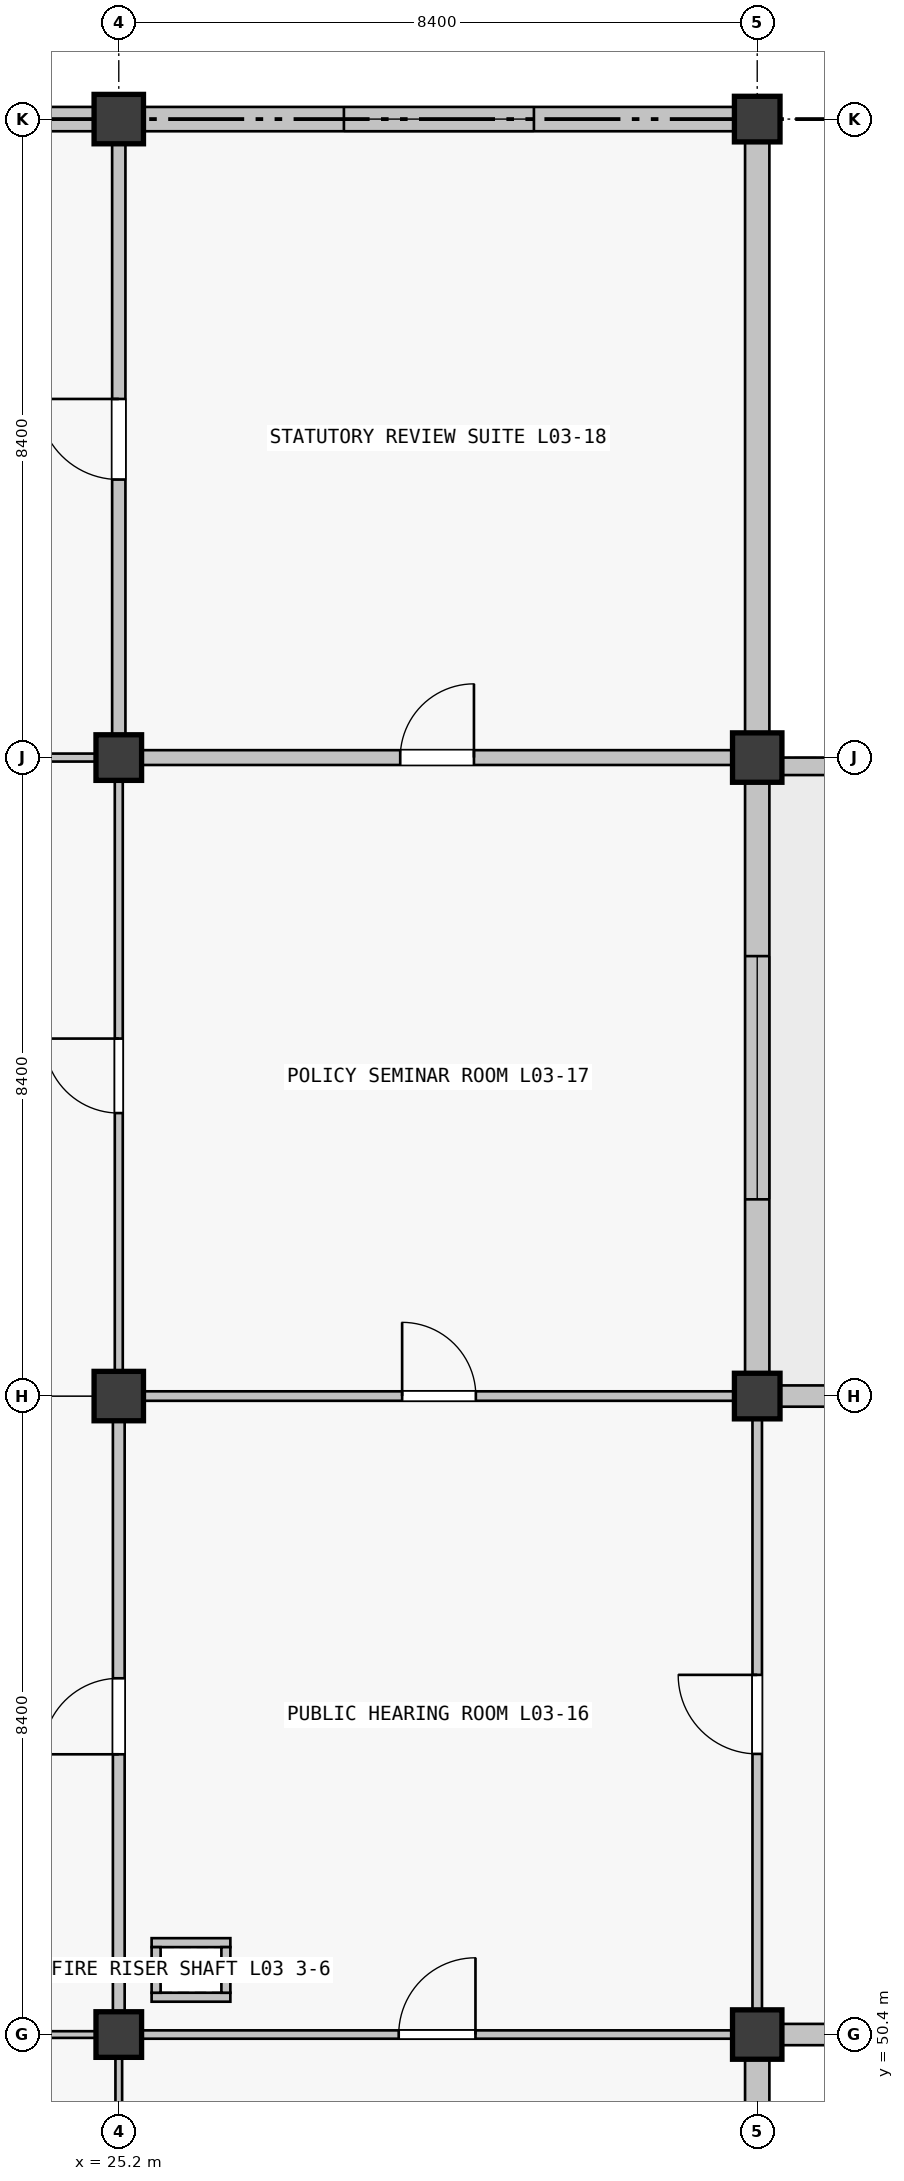
"""IFC4 building model, lengths in metres.
Left out: names, types, materials, properties, quantities, classifications, styles, units other than length and angle.
Written with IfcOpenShell. Run it as: python <this file> out.ifc"""

import sys

from ifc_helpers import new_model, si_unit, direction, frame, frame_2d, origin, origin_2d, place, context, subcontext, project, spatial, rectangle, extrude, element, fill, save


model = new_model("IFC4")
c1 = context("Model", 3, precision=1e-05, world=origin(), true_north=direction((0.0, 1.0)))
c2 = subcontext(c1, "Body", "Model", "MODEL_VIEW")
j1 = project(units=[si_unit("LENGTHUNIT", "METRE"), si_unit("PLANEANGLEUNIT", "RADIAN")], contexts=[c1])
p1 = place(None, origin())
s1 = spatial("IfcSite", under=j1, at=p1, CompositionType="ELEMENT")
p2 = place(p1, origin())
s2 = spatial("IfcBuilding", under=s1, at=p2, CompositionType="ELEMENT")
p3 = place(p2, frame((0.0, 0.0, 14.76)))
s3 = spatial("IfcBuildingStorey", under=s2, at=p3, CompositionType="ELEMENT", Elevation=14.76)
p4 = place(p3, frame((25.2, 50.4, 0.0), z_axis=(0.0, 0.0, 1.0), x_axis=(1.0, 0.0, 0.0)))
e1 = element("IfcColumn", 1, at=p4, inside=s3, PredefinedType="COLUMN", context=c2, shape_type="SweptSolid", body=[
    extrude(rectangle(XDim=0.6, YDim=0.6, at=origin_2d()), origin(), (0.0, 0.0, 1.0), 4.32),
])
p5 = place(p3, frame((25.2, 58.8, 0.0), z_axis=(0.0, 0.0, 1.0), x_axis=(1.0, 0.0, 0.0)))
e2 = element("IfcColumn", 2, at=p5, inside=s3, PredefinedType="COLUMN", context=c2, shape_type="SweptSolid", body=[
    extrude(rectangle(XDim=0.65, YDim=0.65, at=origin_2d()), origin(), (0.0, 0.0, 1.0), 4.32),
])
p6 = place(p3, frame((25.2, 67.2, 0.0), z_axis=(0.0, 0.0, 1.0), x_axis=(1.0, 0.0, 0.0)))
e3 = element("IfcColumn", 3, at=p6, inside=s3, PredefinedType="COLUMN", context=c2, shape_type="SweptSolid", body=[
    extrude(rectangle(XDim=0.6, YDim=0.6, at=origin_2d()), origin(), (0.0, 0.0, 1.0), 4.32),
])
for number, where, z_axis, x_axis in (
    (4, (25.2, 75.6, 0.0), (0.0, 0.0, 1.0), (1.0, 0.0, 0.0)),
    (5, (33.6, 50.4, 0.0), (0.0, 0.0, 1.0), (1.0, 0.0, 0.0)),
):
    element("IfcColumn", number, at=place(p3, frame(where, z_axis=z_axis, x_axis=x_axis)), inside=s3, PredefinedType="COLUMN", context=c2, shape_type="SweptSolid", body=[
        extrude(rectangle(XDim=0.65, YDim=0.65, at=origin_2d()), origin(), (0.0, 0.0, 1.0), 4.32),
    ])
p7 = place(p3, frame((33.6, 58.8, 0.0), z_axis=(0.0, 0.0, 1.0), x_axis=(1.0, 0.0, 0.0)))
e6 = element("IfcColumn", 6, at=p7, inside=s3, PredefinedType="COLUMN", context=c2, shape_type="SweptSolid", body=[
    extrude(rectangle(XDim=0.6, YDim=0.6, at=origin_2d()), origin(), (0.0, 0.0, 1.0), 4.32),
])
p8 = place(p3, frame((33.6, 67.2, 0.0), z_axis=(0.0, 0.0, 1.0), x_axis=(1.0, 0.0, 0.0)))
e7 = element("IfcColumn", 7, at=p8, inside=s3, PredefinedType="COLUMN", context=c2, shape_type="SweptSolid", body=[
    extrude(rectangle(XDim=0.65, YDim=0.65, at=origin_2d()), origin(), (0.0, 0.0, 1.0), 4.32),
])
p9 = place(p3, frame((33.6, 75.6, 0.0), z_axis=(0.0, 0.0, 1.0), x_axis=(1.0, 0.0, 0.0)))
e8 = element("IfcColumn", 8, at=p9, inside=s3, PredefinedType="COLUMN", context=c2, shape_type="SweptSolid", body=[
    extrude(rectangle(XDim=0.6, YDim=0.6, at=origin_2d()), origin(), (0.0, 0.0, 1.0), 4.32),
])
p10 = place(p3, frame((17.101, 75.6, 0.0), z_axis=(0.0, 0.0, 1.0), x_axis=(1.0, 0.0, 0.0)))
e9 = element("IfcWall", 9, at=p10, inside=s3, PredefinedType="SOLIDWALL", context=c2, shape_type="SweptSolid", body=[
    extrude(rectangle(XDim=7.773, YDim=0.32, at=frame_2d((3.886, 0.0))), origin(), (0.0, 0.0, 1.0), 3.37),
])
p11 = place(p10, frame((2.986, 0.0, 0.9)))
e10 = element("IfcOpeningElement", 10, at=p11, cuts=e9, PredefinedType="OPENING", context=c2, shape_type="SweptSolid", body=[
    extrude(rectangle(XDim=1.8, YDim=1.35, at=frame_2d((0.9, 0.675))), frame((0.0, 0.16, 0.0), z_axis=(0.0, -1.0, 0.0), x_axis=(1.0, 0.0, 0.0)), (0.0, 0.0, 1.0), 0.32),
])
p12 = place(p3, frame((33.6, 50.074, 0.0), z_axis=(0.0, 0.0, 1.0), x_axis=(0.0, -1.0, 0.0)))
e11 = element("IfcWall", 11, at=p12, inside=s3, PredefinedType="SOLIDWALL", context=c2, shape_type="SweptSolid", body=[
    extrude(rectangle(XDim=7.773, YDim=0.32, at=frame_2d((3.886, 0.0))), origin(), (0.0, 0.0, 1.0), 3.37),
])
p13 = place(p12, frame((3.186, 0.0, 0.9)))
e12 = element("IfcOpeningElement", 12, at=p13, cuts=e11, PredefinedType="OPENING", context=c2, shape_type="SweptSolid", body=[
    extrude(rectangle(XDim=1.4, YDim=1.75, at=frame_2d((0.7, 0.875))), frame((0.0, 0.16, 0.0), z_axis=(0.0, -1.0, 0.0), x_axis=(1.0, 0.0, 0.0)), (0.0, 0.0, 1.0), 0.32),
])
p14 = place(p3, frame((33.6, 66.874, 0.0), z_axis=(0.0, 0.0, 1.0), x_axis=(0.0, -1.0, 0.0)))
e13 = element("IfcWall", 13, at=p14, inside=s3, PredefinedType="SOLIDWALL", context=c2, shape_type="SweptSolid", body=[
    extrude(rectangle(XDim=7.773, YDim=0.32, at=frame_2d((3.886, 0.0))), origin(), (0.0, 0.0, 1.0), 3.37),
])
p15 = place(p14, frame((2.286, 0.0, 0.9)))
e14 = element("IfcOpeningElement", 14, at=p15, cuts=e13, PredefinedType="OPENING", context=c2, shape_type="SweptSolid", body=[
    extrude(rectangle(XDim=3.2, YDim=1.75, at=frame_2d((1.6, 0.875))), frame((0.0, 0.16, 0.0), z_axis=(0.0, -1.0, 0.0), x_axis=(1.0, 0.0, 0.0)), (0.0, 0.0, 1.0), 0.32),
])
p16 = place(p3, frame((25.526, 75.6, 0.0), z_axis=(0.0, 0.0, 1.0), x_axis=(1.0, 0.0, 0.0)))
e15 = element("IfcWall", 15, at=p16, inside=s3, PredefinedType="SOLIDWALL", context=c2, shape_type="SweptSolid", body=[
    extrude(rectangle(XDim=7.773, YDim=0.32, at=frame_2d((3.887, 0.0))), origin(), (0.0, 0.0, 1.0), 3.37),
])
p17 = place(p16, frame((2.636, 0.0, 0.9)))
e16 = element("IfcOpeningElement", 16, at=p17, cuts=e15, PredefinedType="OPENING", context=c2, shape_type="SweptSolid", body=[
    extrude(rectangle(XDim=2.5, YDim=1.65, at=frame_2d((1.25, 0.825))), frame((0.0, 0.16, 0.0), z_axis=(0.0, -1.0, 0.0), x_axis=(1.0, 0.0, 0.0)), (0.0, 0.0, 1.0), 0.32),
])
p18 = place(p3, frame((33.6, 75.299, 0.0), z_axis=(0.0, 0.0, 1.0), x_axis=(0.0, -1.0, 0.0)))
e17 = element("IfcWall", 17, at=p18, inside=s3, PredefinedType="SOLIDWALL", context=c2, shape_type="SweptSolid", body=[
    extrude(rectangle(XDim=7.773, YDim=0.32, at=frame_2d((3.887, 0.0))), origin(), (0.0, 0.0, 1.0), 3.37),
])
p19 = place(p3, frame((41.724, 50.4, 0.0), z_axis=(0.0, 0.0, 1.0), x_axis=(-1.0, 0.0, 0.0)))
e18 = element("IfcWall", 18, at=p19, inside=s3, PredefinedType="SOLIDWALL", context=c2, shape_type="SweptSolid", body=[
    extrude(rectangle(XDim=7.798, YDim=0.28, at=frame_2d((3.899, 0.0))), origin(), (0.0, 0.0, 1.0), 3.37),
])
p20 = place(p3, frame((33.901, 58.8, 0.0), z_axis=(0.0, 0.0, 1.0), x_axis=(1.0, 0.0, 0.0)))
e19 = element("IfcWall", 19, at=p20, inside=s3, PredefinedType="SOLIDWALL", context=c2, shape_type="SweptSolid", body=[
    extrude(rectangle(XDim=7.823, YDim=0.28, at=frame_2d((3.912, 0.0))), origin(), (0.0, 0.0, 1.0), 3.37),
])
p21 = place(p3, frame((33.86, 67.085, 0.0), z_axis=(0.0, 0.0, 1.0), x_axis=(1.0, 0.0, 0.0)))
e20 = element("IfcWall", 20, at=p21, inside=s3, PredefinedType="PARAPET", context=c2, shape_type="SweptSolid", body=[
    extrude(rectangle(XDim=7.88, YDim=0.23, at=frame_2d((3.94, 0.0))), origin(), (0.0, 0.0, 1.0), 0.95),
])
for number, where, z_axis, x_axis in (
    (21, (25.632, 50.891, 0.0), (0.0, 0.0, 1.0), (1.0, 0.0, 0.0)),
    (22, (25.632, 51.609, 0.0), (0.0, 0.0, 1.0), (1.0, 0.0, 0.0)),
):
    element("IfcWall", number, at=place(p3, frame(where, z_axis=z_axis, x_axis=x_axis)), inside=s3, PredefinedType="PARTITIONING", context=c2, shape_type="SweptSolid", body=[
        extrude(rectangle(XDim=1.036, YDim=0.118, at=frame_2d((0.518, 0.0))), origin(), (0.0, 0.0, 1.0), 3.35),
    ])
for number, where, z_axis, x_axis in (
    (23, (25.691, 50.95, 0.0), (0.0, 0.0, 1.0), (0.0, 1.0, 0.0)),
    (24, (26.609, 50.95, 0.0), (0.0, 0.0, 1.0), (0.0, 1.0, 0.0)),
):
    element("IfcWall", number, at=place(p3, frame(where, z_axis=z_axis, x_axis=x_axis)), inside=s3, PredefinedType="PARTITIONING", context=c2, shape_type="SweptSolid", body=[
        extrude(rectangle(XDim=0.6, YDim=0.118, at=frame_2d((0.3, 0.0))), origin(), (0.0, 0.0, 1.0), 3.35),
    ])
p22 = place(p3, frame((17.127, 50.4, 0.0), z_axis=(0.0, 0.0, 1.0), x_axis=(1.0, 0.0, 0.0)))
e25 = element("IfcWall", 25, at=p22, inside=s3, PredefinedType="PARTITIONING", context=c2, shape_type="SweptSolid", body=[
    extrude(rectangle(XDim=7.771, YDim=0.088, at=frame_2d((3.885, 0.0))), origin(), (0.0, 0.0, 1.0), 3.19),
])
p23 = place(p22, frame((0.658, 0.0, 0.0)))
e26 = element("IfcOpeningElement", 26, at=p23, cuts=e25, PredefinedType="OPENING", context=c2, shape_type="SweptSolid", body=[
    extrude(rectangle(XDim=0.96, YDim=2.1, at=frame_2d((0.48, 1.05))), frame((0.0, 0.044, 0.0), z_axis=(0.0, -1.0, 0.0), x_axis=(1.0, 0.0, 0.0)), (0.0, 0.0, 1.0), 0.088),
])
p24 = place(p22, frame((4.598, 0.0, 0.0)))
e27 = element("IfcOpeningElement", 27, at=p24, cuts=e25, PredefinedType="OPENING", context=c2, shape_type="SweptSolid", body=[
    extrude(rectangle(XDim=0.92, YDim=2.1, at=frame_2d((0.46, 1.05))), frame((0.0, 0.044, 0.0), z_axis=(0.0, -1.0, 0.0), x_axis=(1.0, 0.0, 0.0)), (0.0, 0.0, 1.0), 0.088),
])
p25 = place(p3, frame((17.127, 67.2, 0.0), z_axis=(0.0, 0.0, 1.0), x_axis=(1.0, 0.0, 0.0)))
e28 = element("IfcWall", 28, at=p25, inside=s3, PredefinedType="PARTITIONING", context=c2, shape_type="SweptSolid", body=[
    extrude(rectangle(XDim=7.771, YDim=0.105, at=frame_2d((3.885, 0.0))), origin(), (0.0, 0.0, 1.0), 3.19),
])
p26 = place(p25, frame((3.356, 0.0, 0.0)))
e29 = element("IfcOpeningElement", 29, at=p26, cuts=e28, PredefinedType="OPENING", context=c2, shape_type="SweptSolid", body=[
    extrude(rectangle(XDim=1.06, YDim=2.25, at=frame_2d((0.53, 1.125))), frame((0.0, 0.052, 0.0), z_axis=(0.0, -1.0, 0.0), x_axis=(1.0, 0.0, 0.0)), (0.0, 0.0, 1.0), 0.105),
])
p27 = place(p3, frame((25.502, 50.4, 0.0), z_axis=(0.0, 0.0, 1.0), x_axis=(1.0, 0.0, 0.0)))
e30 = element("IfcWall", 30, at=p27, inside=s3, PredefinedType="MOVABLE", context=c2, shape_type="SweptSolid", body=[
    extrude(rectangle(XDim=7.771, YDim=0.11, at=frame_2d((3.885, 0.0))), origin(), (0.0, 0.0, 1.0), 3.19),
])
p28 = place(p27, frame((3.381, 0.0, 0.0)))
e31 = element("IfcOpeningElement", 31, at=p28, cuts=e30, PredefinedType="OPENING", context=c2, shape_type="SweptSolid", body=[
    extrude(rectangle(XDim=1.01, YDim=2.12, at=frame_2d((0.505, 1.06))), frame((0.0, 0.055, 0.0), z_axis=(0.0, -1.0, 0.0), x_axis=(1.0, 0.0, 0.0)), (0.0, 0.0, 1.0), 0.11),
])
p29 = place(p3, frame((25.527, 58.8, 0.0), z_axis=(0.0, 0.0, 1.0), x_axis=(1.0, 0.0, 0.0)))
e32 = element("IfcWall", 32, at=p29, inside=s3, PredefinedType="PARTITIONING", context=c2, shape_type="SweptSolid", body=[
    extrude(rectangle(XDim=7.771, YDim=0.125, at=frame_2d((3.885, 0.0))), origin(), (0.0, 0.0, 1.0), 3.19),
])
p30 = place(p29, frame((3.401, 0.0, 0.0)))
e33 = element("IfcOpeningElement", 33, at=p30, cuts=e32, PredefinedType="OPENING", context=c2, shape_type="SweptSolid", body=[
    extrude(rectangle(XDim=0.97, YDim=2.12, at=frame_2d((0.485, 1.06))), frame((0.0, 0.062, 0.0), z_axis=(0.0, -1.0, 0.0), x_axis=(1.0, 0.0, 0.0)), (0.0, 0.0, 1.0), 0.125),
])
p31 = place(p3, frame((25.502, 67.2, 0.0), z_axis=(0.0, 0.0, 1.0), x_axis=(1.0, 0.0, 0.0)))
e34 = element("IfcWall", 34, at=p31, inside=s3, PredefinedType="PARTITIONING", context=c2, shape_type="SweptSolid", body=[
    extrude(rectangle(XDim=7.771, YDim=0.195, at=frame_2d((3.885, 0.0))), origin(), (0.0, 0.0, 1.0), 3.19),
])
p32 = place(p31, frame((3.401, 0.0, 0.0)))
e35 = element("IfcOpeningElement", 35, at=p32, cuts=e34, PredefinedType="OPENING", context=c2, shape_type="SweptSolid", body=[
    extrude(rectangle(XDim=0.97, YDim=2.12, at=frame_2d((0.485, 1.06))), frame((0.0, 0.098, 0.0), z_axis=(0.0, -1.0, 0.0), x_axis=(1.0, 0.0, 0.0)), (0.0, 0.0, 1.0), 0.195),
])
p33 = place(p3, frame((25.2, 42.327, 0.0), z_axis=(0.0, 0.0, 1.0), x_axis=(0.0, 1.0, 0.0)))
e36 = element("IfcWall", 36, at=p33, inside=s3, PredefinedType="PARTITIONING", context=c2, shape_type="SweptSolid", body=[
    extrude(rectangle(XDim=7.771, YDim=0.088, at=frame_2d((3.885, 0.0))), origin(), (0.0, 0.0, 1.0), 3.19),
])
p34 = place(p3, frame((25.2, 50.702, 0.0), z_axis=(0.0, 0.0, 1.0), x_axis=(0.0, 1.0, 0.0)))
e37 = element("IfcWall", 37, at=p34, inside=s3, PredefinedType="PARTITIONING", context=c2, shape_type="SweptSolid", body=[
    extrude(rectangle(XDim=7.771, YDim=0.155, at=frame_2d((3.885, 0.0))), origin(), (0.0, 0.0, 1.0), 3.19),
])
p35 = place(p34, frame((3.385, 0.0, 0.0)))
e38 = element("IfcOpeningElement", 38, at=p35, cuts=e37, PredefinedType="OPENING", context=c2, shape_type="SweptSolid", body=[
    extrude(rectangle(XDim=1.0, YDim=2.2, at=frame_2d((0.5, 1.1))), frame((0.0, 0.078, 0.0), z_axis=(0.0, -1.0, 0.0), x_axis=(1.0, 0.0, 0.0)), (0.0, 0.0, 1.0), 0.155),
])
p36 = place(p3, frame((25.2, 59.127, 0.0), z_axis=(0.0, 0.0, 1.0), x_axis=(0.0, 1.0, 0.0)))
e39 = element("IfcWall", 39, at=p36, inside=s3, PredefinedType="PARTITIONING", context=c2, shape_type="SweptSolid", body=[
    extrude(rectangle(XDim=7.771, YDim=0.105, at=frame_2d((3.885, 0.0))), origin(), (0.0, 0.0, 1.0), 3.19),
])
p37 = place(p36, frame((3.396, 0.0, 0.0)))
e40 = element("IfcOpeningElement", 40, at=p37, cuts=e39, PredefinedType="OPENING", context=c2, shape_type="SweptSolid", body=[
    extrude(rectangle(XDim=0.98, YDim=2.18, at=frame_2d((0.49, 1.09))), frame((0.0, 0.052, 0.0), z_axis=(0.0, -1.0, 0.0), x_axis=(1.0, 0.0, 0.0)), (0.0, 0.0, 1.0), 0.105),
])
p38 = place(p3, frame((25.2, 67.502, 0.0), z_axis=(0.0, 0.0, 1.0), x_axis=(0.0, 1.0, 0.0)))
e41 = element("IfcWall", 41, at=p38, inside=s3, PredefinedType="PARTITIONING", context=c2, shape_type="SweptSolid", body=[
    extrude(rectangle(XDim=7.771, YDim=0.175, at=frame_2d((3.885, 0.0))), origin(), (0.0, 0.0, 1.0), 3.19),
])
p39 = place(p38, frame((3.356, 0.0, 0.0)))
e42 = element("IfcOpeningElement", 42, at=p39, cuts=e41, PredefinedType="OPENING", context=c2, shape_type="SweptSolid", body=[
    extrude(rectangle(XDim=1.06, YDim=2.25, at=frame_2d((0.53, 1.125))), frame((0.0, 0.087, 0.0), z_axis=(0.0, -1.0, 0.0), x_axis=(1.0, 0.0, 0.0)), (0.0, 0.0, 1.0), 0.175),
])
p40 = place(p3, frame((33.6, 50.727, 0.0), z_axis=(0.0, 0.0, 1.0), x_axis=(0.0, 1.0, 0.0)))
e43 = element("IfcWall", 43, at=p40, inside=s3, PredefinedType="PARTITIONING", context=c2, shape_type="SweptSolid", body=[
    extrude(rectangle(XDim=7.771, YDim=0.125, at=frame_2d((3.885, 0.0))), origin(), (0.0, 0.0, 1.0), 3.19),
])
p41 = place(p40, frame((3.365, 0.0, 0.0)))
e44 = element("IfcOpeningElement", 44, at=p41, cuts=e43, PredefinedType="OPENING", context=c2, shape_type="SweptSolid", body=[
    extrude(rectangle(XDim=1.04, YDim=2.2, at=frame_2d((0.52, 1.1))), frame((0.0, 0.062, 0.0), z_axis=(0.0, -1.0, 0.0), x_axis=(1.0, 0.0, 0.0)), (0.0, 0.0, 1.0), 0.125),
])
p42 = place(p15, origin())
e45 = element("IfcWindow", 45, at=p42, inside=s3, PartitioningType="SINGLE_PANEL", PredefinedType="WINDOW", context=c2, shape_type="SweptSolid", body=[
    extrude(rectangle(XDim=3.2, YDim=1.75, at=frame_2d((1.6, 0.875))), frame((0.0, 0.03, 0.0), z_axis=(0.0, -1.0, 0.0), x_axis=(1.0, 0.0, 0.0)), (0.0, 0.0, 1.0), 0.06),
])
fill(e14, e45)
p43 = place(p17, origin())
e46 = element("IfcWindow", 46, at=p43, inside=s3, PartitioningType="SINGLE_PANEL", PredefinedType="WINDOW", context=c2, shape_type="SweptSolid", body=[
    extrude(rectangle(XDim=2.5, YDim=1.65, at=frame_2d((1.25, 0.825))), frame((0.0, 0.03, 0.0), z_axis=(0.0, -1.0, 0.0), x_axis=(1.0, 0.0, 0.0)), (0.0, 0.0, 1.0), 0.06),
])
fill(e16, e46)
p44 = place(p35, origin())
e47 = element("IfcDoor", 47, at=p44, inside=s3, OperationType="SINGLE_SWING_LEFT", PredefinedType="DOOR", context=c2, shape_type="SweptSolid", body=[
    extrude(rectangle(XDim=1.0, YDim=2.2, at=frame_2d((0.5, 1.1))), frame((0.0, 0.025, 0.0), z_axis=(0.0, -1.0, 0.0), x_axis=(1.0, 0.0, 0.0)), (0.0, 0.0, 1.0), 0.05),
])
fill(e38, e47)
p45 = place(p37, origin())
e48 = element("IfcDoor", 48, at=p45, inside=s3, OperationType="SINGLE_SWING_RIGHT", PredefinedType="DOOR", context=c2, shape_type="SweptSolid", body=[
    extrude(rectangle(XDim=0.98, YDim=2.18, at=frame_2d((0.49, 1.09))), frame((0.0, 0.025, 0.0), z_axis=(0.0, -1.0, 0.0), x_axis=(1.0, 0.0, 0.0)), (0.0, 0.0, 1.0), 0.05),
])
fill(e40, e48)
p46 = place(p32, origin())
e49 = element("IfcDoor", 49, at=p46, inside=s3, OperationType="SINGLE_SWING_RIGHT", PredefinedType="DOOR", context=c2, shape_type="SweptSolid", body=[
    extrude(rectangle(XDim=0.97, YDim=2.12, at=frame_2d((0.485, 1.06))), frame((0.0, 0.025, 0.0), z_axis=(0.0, -1.0, 0.0), x_axis=(1.0, 0.0, 0.0)), (0.0, 0.0, 1.0), 0.05),
])
fill(e35, e49)
p47 = place(p41, origin())
e50 = element("IfcDoor", 50, at=p47, inside=s3, OperationType="SINGLE_SWING_RIGHT", PredefinedType="DOOR", context=c2, shape_type="SweptSolid", body=[
    extrude(rectangle(XDim=1.04, YDim=2.2, at=frame_2d((0.52, 1.1))), frame((0.0, 0.025, 0.0), z_axis=(0.0, -1.0, 0.0), x_axis=(1.0, 0.0, 0.0)), (0.0, 0.0, 1.0), 0.05),
])
fill(e44, e50)
p48 = place(p28, origin())
e51 = element("IfcDoor", 51, at=p48, inside=s3, OperationType="SINGLE_SWING_RIGHT", PredefinedType="DOOR", context=c2, shape_type="SweptSolid", body=[
    extrude(rectangle(XDim=1.01, YDim=2.12, at=frame_2d((0.505, 1.06))), frame((0.0, 0.025, 0.0), z_axis=(0.0, -1.0, 0.0), x_axis=(1.0, 0.0, 0.0)), (0.0, 0.0, 1.0), 0.05),
])
fill(e31, e51)
p49 = place(p30, origin())
e52 = element("IfcDoor", 52, at=p49, inside=s3, OperationType="SINGLE_SWING_LEFT", PredefinedType="DOOR", context=c2, shape_type="SweptSolid", body=[
    extrude(rectangle(XDim=0.97, YDim=2.12, at=frame_2d((0.485, 1.06))), frame((0.0, 0.025, 0.0), z_axis=(0.0, -1.0, 0.0), x_axis=(1.0, 0.0, 0.0)), (0.0, 0.0, 1.0), 0.05),
])
fill(e33, e52)
p50 = place(p39, origin())
e53 = element("IfcDoor", 53, at=p50, inside=s3, OperationType="SINGLE_SWING_RIGHT", PredefinedType="DOOR", context=c2, shape_type="SweptSolid", body=[
    extrude(rectangle(XDim=1.06, YDim=2.25, at=frame_2d((0.53, 1.125))), frame((0.0, 0.025, 0.0), z_axis=(0.0, -1.0, 0.0), x_axis=(1.0, 0.0, 0.0)), (0.0, 0.0, 1.0), 0.05),
])
fill(e42, e53)
save(model, sys.argv[1])
